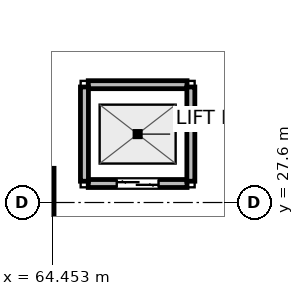
"""IFC4 building model, lengths in metres.
Left out: names, types, materials, properties, quantities, classifications, styles, units other than length and angle.
Written with IfcOpenShell. Run it as: python <this file> out.ifc"""

import sys

from ifc_helpers import new_model, si_unit, direction, frame, frame_2d, origin, origin_2d, place, context, subcontext, project, spatial, rectangle, extrude, element, fill, save


model = new_model("IFC4")
c1 = context("Model", 3, precision=1e-05, world=origin(), true_north=direction((0.0, 1.0)))
c2 = subcontext(c1, "Body", "Model", "MODEL_VIEW")
j1 = project(units=[si_unit("LENGTHUNIT", "METRE"), si_unit("PLANEANGLEUNIT", "RADIAN")], contexts=[c1])
p1 = place(None, origin())
s1 = spatial("IfcSite", under=j1, at=p1, CompositionType="ELEMENT")
p2 = place(p1, origin())
s2 = spatial("IfcBuilding", under=s1, at=p2, CompositionType="ELEMENT")
p3 = place(p2, frame((0.0, 0.0, -9.0)))
s3 = spatial("IfcBuildingStorey", under=s2, at=p3, CompositionType="ELEMENT", Elevation=-9.0)
p4 = place(p3, frame((63.6, 27.6, 0.0), z_axis=(0.0, 0.0, 1.0), x_axis=(1.0, 0.0, 0.0)))
e1 = element("IfcColumn", 1, at=p4, inside=s3, PredefinedType="COLUMN", context=c2, shape_type="SweptSolid", body=[
    extrude(rectangle(XDim=1.8, YDim=1.8, at=origin_2d()), origin(), (0.0, 0.0, 1.0), 4.5),
])
p5 = place(p3, frame((65.4, 28.1, 0.0), z_axis=(0.0, 0.0, 1.0), x_axis=(1.0, 0.0, 0.0)))
e2 = element("IfcWall", 2, at=p5, inside=s3, PredefinedType="PARTITIONING", context=c2, shape_type="SweptSolid", body=[
    extrude(rectangle(XDim=2.6, YDim=0.21, at=frame_2d((1.3, 0.0))), origin(), (0.0, 0.0, 1.0), 4.18),
])
p6 = place(p5, frame((0.75, 0.0, 0.0)))
e3 = element("IfcOpeningElement", 3, at=p6, cuts=e2, PredefinedType="OPENING", context=c2, shape_type="SweptSolid", body=[
    extrude(rectangle(XDim=1.1, YDim=2.04, at=frame_2d((0.55, 1.02))), frame((0.0, 0.115, 0.0), z_axis=(0.0, -1.0, 0.0), x_axis=(1.0, 0.0, 0.0)), (0.0, 0.0, 1.0), 0.23),
])
p7 = place(p3, frame((65.4, 30.7, 0.0), z_axis=(0.0, 0.0, 1.0), x_axis=(1.0, 0.0, 0.0)))
e4 = element("IfcWall", 4, at=p7, inside=s3, PredefinedType="PARTITIONING", context=c2, shape_type="SweptSolid", body=[
    extrude(rectangle(XDim=2.6, YDim=0.21, at=frame_2d((1.3, 0.0))), origin(), (0.0, 0.0, 1.0), 4.18),
])
for number, where, z_axis, x_axis in (
    (5, (65.3, 28.16, 0.0), (0.0, 0.0, 1.0), (0.0, 1.0, 0.0)),
    (6, (68.1, 28.16, 0.0), (0.0, 0.0, 1.0), (0.0, 1.0, 0.0)),
):
    element("IfcWall", number, at=place(p3, frame(where, z_axis=z_axis, x_axis=x_axis)), inside=s3, PredefinedType="PARTITIONING", context=c2, shape_type="SweptSolid", body=[
        extrude(rectangle(XDim=2.48, YDim=0.21, at=frame_2d((1.24, 0.0))), origin(), (0.0, 0.0, 1.0), 4.18),
    ])
p8 = place(p6, origin())
e7 = element("IfcDoor", 7, at=p8, inside=s3, OperationType="DOUBLE_DOOR_SLIDING", PredefinedType="DOOR", context=c2, shape_type="SweptSolid", body=[
    extrude(rectangle(XDim=1.1, YDim=2.04, at=frame_2d((0.55, 1.02))), frame((0.0, 0.025, 0.0), z_axis=(0.0, -1.0, 0.0), x_axis=(1.0, 0.0, 0.0)), (0.0, 0.0, 1.0), 0.05),
])
fill(e3, e7)
save(model, sys.argv[1])
